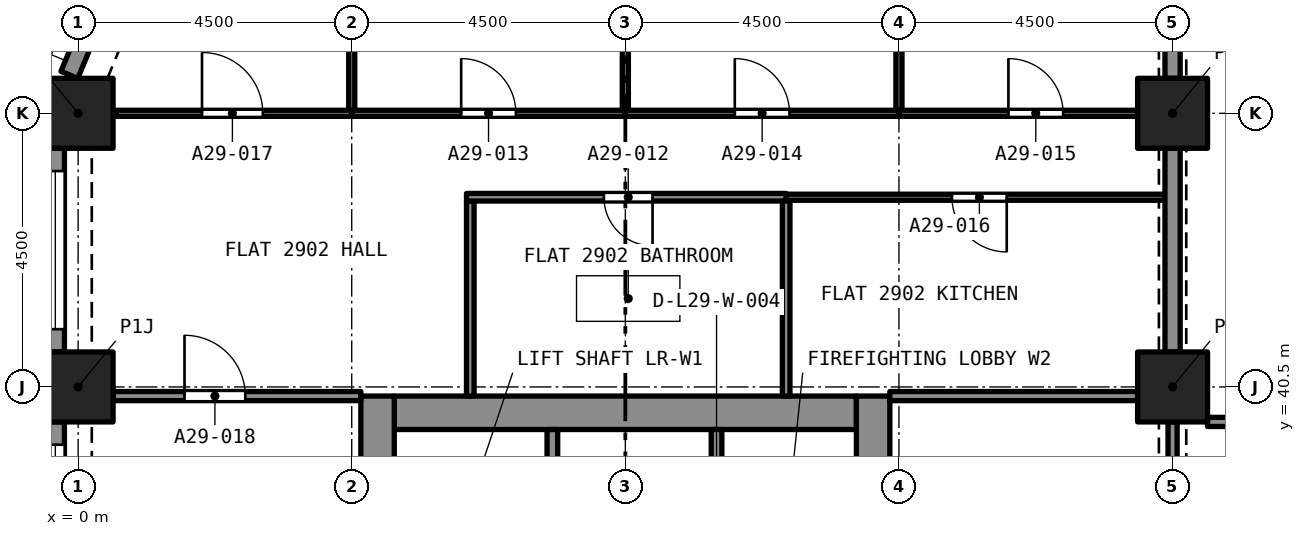
"""IFC4 building model, lengths in metres.
Left out: names, types, materials, properties, quantities, classifications, styles, units other than length and angle.
Written with IfcOpenShell. Run it as: python <this file> out.ifc"""

import sys

from ifc_helpers import new_model, si_unit, direction, frame, frame_2d, origin, origin_2d, place, context, subcontext, project, spatial, rectangle, extrude, element, fill, save


model = new_model("IFC4")
c1 = context("Model", 3, precision=1e-05, world=origin(), true_north=direction((0.0, 1.0)))
c2 = subcontext(c1, "Body", "Model", "MODEL_VIEW")
j1 = project(units=[si_unit("LENGTHUNIT", "METRE"), si_unit("PLANEANGLEUNIT", "RADIAN")], contexts=[c1])
p1 = place(None, origin())
s1 = spatial("IfcSite", under=j1, at=p1, CompositionType="ELEMENT")
p2 = place(p1, origin())
s2 = spatial("IfcBuilding", under=s1, at=p2, CompositionType="ELEMENT")
p3 = place(p2, frame((0.0, 0.0, 105.6)))
s3 = spatial("IfcBuildingStorey", under=s2, at=p3, CompositionType="ELEMENT", Elevation=105.6)
for number, where, z_axis, x_axis in (
    (1, (0.0, 40.5, 0.0), (0.0, 0.0, 1.0), (1.0, 0.0, 0.0)),
    (2, (18.0, 40.5, 0.0), (0.0, 0.0, 1.0), (1.0, 0.0, 0.0)),
    (3, (0.0, 45.0, 0.0), (0.0, 0.0, 1.0), (1.0, 0.0, 0.0)),
    (4, (18.0, 45.0, 0.0), (0.0, 0.0, 1.0), (1.0, 0.0, 0.0)),
):
    element("IfcColumn", number, at=place(p3, frame(where, z_axis=z_axis, x_axis=x_axis)), inside=s3, PredefinedType="COLUMN", context=c2, shape_type="SweptSolid", body=[
        extrude(rectangle(XDim=1.15, YDim=1.15, at=origin_2d()), origin(), (0.0, 0.0, 1.0), 3.2),
    ])
p4 = place(p3, frame((5.2, 40.075, 0.0), z_axis=(0.0, 0.0, 1.0), x_axis=(1.0, 0.0, 0.0)))
e5 = element("IfcWall", 5, at=p4, inside=s3, PredefinedType="SOLIDWALL", context=c2, shape_type="SweptSolid", body=[
    extrude(rectangle(XDim=7.6, YDim=0.55, at=frame_2d((3.8, 0.0))), origin(), (0.0, 0.0, 1.0), 3.2),
])
p5 = place(p3, frame((4.925, 27.15, 0.0), z_axis=(0.0, 0.0, 1.0), x_axis=(0.0, 1.0, 0.0)))
e6 = element("IfcWall", 6, at=p5, inside=s3, PredefinedType="SOLIDWALL", context=c2, shape_type="SweptSolid", body=[
    extrude(rectangle(XDim=13.2, YDim=0.55, at=frame_2d((6.6, 0.0))), origin(), (0.0, 0.0, 1.0), 3.2),
])
p6 = place(p5, frame((8.8, 0.0, 0.0)))
e7 = element("IfcOpeningElement", 7, at=p6, cuts=e6, PredefinedType="OPENING", context=c2, shape_type="SweptSolid", body=[
    extrude(rectangle(XDim=1.2, YDim=2.1, at=frame_2d((0.6, 1.05))), frame((0.0, 0.285, 0.0), z_axis=(0.0, -1.0, 0.0), x_axis=(1.0, 0.0, 0.0)), (0.0, 0.0, 1.0), 0.57),
])
p7 = place(p3, frame((13.075, 27.15, 0.0), z_axis=(0.0, 0.0, 1.0), x_axis=(0.0, 1.0, 0.0)))
e8 = element("IfcWall", 8, at=p7, inside=s3, PredefinedType="SOLIDWALL", context=c2, shape_type="SweptSolid", body=[
    extrude(rectangle(XDim=13.2, YDim=0.55, at=frame_2d((6.6, 0.0))), origin(), (0.0, 0.0, 1.0), 3.2),
])
p8 = place(p7, frame((10.95, 0.0, 0.0)))
e9 = element("IfcOpeningElement", 9, at=p8, cuts=e8, PredefinedType="OPENING", context=c2, shape_type="SweptSolid", body=[
    extrude(rectangle(XDim=1.1, YDim=2.1, at=frame_2d((0.55, 1.05))), frame((0.0, 0.285, 0.0), z_axis=(0.0, -1.0, 0.0), x_axis=(1.0, 0.0, 0.0)), (0.0, 0.0, 1.0), 0.57),
])
p9 = place(p7, frame((8.8, 0.0, 0.0)))
e10 = element("IfcOpeningElement", 10, at=p9, cuts=e8, PredefinedType="OPENING", context=c2, shape_type="SweptSolid", body=[
    extrude(rectangle(XDim=1.2, YDim=2.1, at=frame_2d((0.6, 1.05))), frame((0.0, 0.285, 0.0), z_axis=(0.0, -1.0, 0.0), x_axis=(1.0, 0.0, 0.0)), (0.0, 0.0, 1.0), 0.57),
])
p10 = place(p3, frame((-0.144, 45.632, 0.0), z_axis=(0.0, 0.0, 1.0), x_axis=(0.382723818695, 0.923862802911, 0.0)))
e11 = element("IfcWall", 11, at=p10, inside=s3, PredefinedType="SOLIDWALL", context=c2, shape_type="SweptSolid", body=[
    extrude(rectangle(XDim=2.164, YDim=0.3, at=frame_2d((1.082, 0.0))), origin(), (0.0, 0.0, 1.0), 3.2),
])
p11 = place(p10, frame((0.493, 0.0, 0.45)))
e12 = element("IfcOpeningElement", 12, at=p11, cuts=e11, PredefinedType="OPENING", context=c2, shape_type="SweptSolid", body=[
    extrude(rectangle(XDim=1.4, YDim=1.95, at=frame_2d((0.7, 0.975))), frame((0.0, 0.16, 0.0), z_axis=(0.0, -1.0, 0.0), x_axis=(1.0, 0.0, 0.0)), (0.0, 0.0, 1.0), 0.32),
])
p12 = place(p3, frame((-0.375, 41.075, 0.0), z_axis=(0.0, 0.0, 1.0), x_axis=(0.0, 1.0, 0.0)))
e13 = element("IfcWall", 13, at=p12, inside=s3, PredefinedType="SOLIDWALL", context=c2, shape_type="SweptSolid", body=[
    extrude(rectangle(XDim=3.35, YDim=0.3, at=frame_2d((1.675, 0.0))), origin(), (0.0, 0.0, 1.0), 3.2),
])
p13 = place(p12, frame((0.375, 0.0, 0.45)))
e14 = element("IfcOpeningElement", 14, at=p13, cuts=e13, PredefinedType="OPENING", context=c2, shape_type="SweptSolid", body=[
    extrude(rectangle(XDim=2.6, YDim=1.95, at=frame_2d((1.3, 0.975))), frame((0.0, 0.16, 0.0), z_axis=(0.0, -1.0, 0.0), x_axis=(1.0, 0.0, 0.0)), (0.0, 0.0, 1.0), 0.32),
])
p14 = place(p3, frame((-0.375, 36.575, 0.0), z_axis=(0.0, 0.0, 1.0), x_axis=(0.0, 1.0, 0.0)))
e15 = element("IfcWall", 15, at=p14, inside=s3, PredefinedType="SOLIDWALL", context=c2, shape_type="SweptSolid", body=[
    extrude(rectangle(XDim=3.35, YDim=0.3, at=frame_2d((1.675, 0.0))), origin(), (0.0, 0.0, 1.0), 3.2),
])
p15 = place(p14, frame((0.375, 0.0, 0.45)))
e16 = element("IfcOpeningElement", 16, at=p15, cuts=e15, PredefinedType="OPENING", context=c2, shape_type="SweptSolid", body=[
    extrude(rectangle(XDim=2.6, YDim=1.95, at=frame_2d((1.3, 0.975))), frame((0.0, 0.16, 0.0), z_axis=(0.0, -1.0, 0.0), x_axis=(1.0, 0.0, 0.0)), (0.0, 0.0, 1.0), 0.32),
])
p16 = place(p3, frame((6.45, 40.35, 0.0), z_axis=(0.0, 0.0, 1.0), x_axis=(0.0, 1.0, 0.0)))
e17 = element("IfcWall", 17, at=p16, inside=s3, PredefinedType="PARTITIONING", context=c2, shape_type="SweptSolid", body=[
    extrude(rectangle(XDim=3.208, YDim=0.125, at=frame_2d((1.604, 0.0))), origin(), (0.0, 0.0, 1.0), 2.9),
])
p17 = place(p3, frame((11.645, 43.62, 0.0), z_axis=(0.0, 0.0, 1.0), x_axis=(-1.0, 0.0, 0.0)))
e18 = element("IfcWall", 18, at=p17, inside=s3, PredefinedType="PARTITIONING", context=c2, shape_type="SweptSolid", body=[
    extrude(rectangle(XDim=5.258, YDim=0.125, at=frame_2d((2.629, 0.0))), origin(), (0.0, 0.0, 1.0), 2.9),
])
p18 = place(p17, frame((2.198, 0.0, 0.0)))
e19 = element("IfcOpeningElement", 19, at=p18, cuts=e18, PredefinedType="OPENING", context=c2, shape_type="SweptSolid", body=[
    extrude(rectangle(XDim=0.8, YDim=2.1, at=frame_2d((0.4, 1.05))), frame((0.0, 0.073, 0.0), z_axis=(0.0, -1.0, 0.0), x_axis=(1.0, 0.0, 0.0)), (0.0, 0.0, 1.0), 0.145),
])
p19 = place(p3, frame((11.645, 40.35, 0.0), z_axis=(0.0, 0.0, 1.0), x_axis=(0.0, 1.0, 0.0)))
e20 = element("IfcWall", 20, at=p19, inside=s3, PredefinedType="PARTITIONING", context=c2, shape_type="SweptSolid", body=[
    extrude(rectangle(XDim=3.208, YDim=0.125, at=frame_2d((1.604, 0.0))), origin(), (0.0, 0.0, 1.0), 2.9),
])
p20 = place(p3, frame((9.0, 45.05, 0.0), z_axis=(0.0, 0.0, 1.0), x_axis=(0.0, 1.0, 0.0)))
e21 = element("IfcWall", 21, at=p20, inside=s3, PredefinedType="PARTITIONING", context=c2, shape_type="SweptSolid", body=[
    extrude(rectangle(XDim=3.875, YDim=0.1, at=frame_2d((1.938, 0.0))), origin(), (0.0, 0.0, 1.0), 2.9),
])
p21 = place(p3, frame((4.5, 45.0, 0.0), z_axis=(0.0, 0.0, 1.0), x_axis=(1.0, 0.0, 0.0)))
e22 = element("IfcWall", 22, at=p21, inside=s3, PredefinedType="PARTITIONING", context=c2, shape_type="SweptSolid", body=[
    extrude(rectangle(XDim=4.5, YDim=0.1, at=frame_2d((2.25, 0.0))), origin(), (0.0, 0.0, 1.0), 2.9),
])
p22 = place(p21, frame((1.8, 0.0, 0.0)))
e23 = element("IfcOpeningElement", 23, at=p22, cuts=e22, PredefinedType="OPENING", context=c2, shape_type="SweptSolid", body=[
    extrude(rectangle(XDim=0.9, YDim=2.1, at=frame_2d((0.45, 1.05))), frame((0.0, 0.06, 0.0), z_axis=(0.0, -1.0, 0.0), x_axis=(1.0, 0.0, 0.0)), (0.0, 0.0, 1.0), 0.12),
])
p23 = place(p3, frame((4.5, 45.05, 0.0), z_axis=(0.0, 0.0, 1.0), x_axis=(0.0, 1.0, 0.0)))
e24 = element("IfcWall", 24, at=p23, inside=s3, PredefinedType="PARTITIONING", context=c2, shape_type="SweptSolid", body=[
    extrude(rectangle(XDim=3.828, YDim=0.1, at=frame_2d((1.914, 0.0))), origin(), (0.0, 0.0, 1.0), 2.9),
])
p24 = place(p3, frame((13.5, 45.05, 0.0), z_axis=(0.0, 0.0, 1.0), x_axis=(0.0, 1.0, 0.0)))
e25 = element("IfcWall", 25, at=p24, inside=s3, PredefinedType="PARTITIONING", context=c2, shape_type="SweptSolid", body=[
    extrude(rectangle(XDim=3.875, YDim=0.1, at=frame_2d((1.938, 0.0))), origin(), (0.0, 0.0, 1.0), 2.9),
])
p25 = place(p3, frame((9.0, 45.0, 0.0), z_axis=(0.0, 0.0, 1.0), x_axis=(1.0, 0.0, 0.0)))
e26 = element("IfcWall", 26, at=p25, inside=s3, PredefinedType="PARTITIONING", context=c2, shape_type="SweptSolid", body=[
    extrude(rectangle(XDim=4.5, YDim=0.1, at=frame_2d((2.25, 0.0))), origin(), (0.0, 0.0, 1.0), 2.9),
])
p26 = place(p25, frame((1.8, 0.0, 0.0)))
e27 = element("IfcOpeningElement", 27, at=p26, cuts=e26, PredefinedType="OPENING", context=c2, shape_type="SweptSolid", body=[
    extrude(rectangle(XDim=0.9, YDim=2.1, at=frame_2d((0.45, 1.05))), frame((0.0, 0.06, 0.0), z_axis=(0.0, -1.0, 0.0), x_axis=(1.0, 0.0, 0.0)), (0.0, 0.0, 1.0), 0.12),
])
p27 = place(p3, frame((13.5, 45.0, 0.0), z_axis=(0.0, 0.0, 1.0), x_axis=(1.0, 0.0, 0.0)))
e28 = element("IfcWall", 28, at=p27, inside=s3, PredefinedType="PARTITIONING", context=c2, shape_type="SweptSolid", body=[
    extrude(rectangle(XDim=3.925, YDim=0.1, at=frame_2d((1.962, 0.0))), origin(), (0.0, 0.0, 1.0), 2.9),
])
p28 = place(p27, frame((1.8, 0.0, 0.0)))
e29 = element("IfcOpeningElement", 29, at=p28, cuts=e28, PredefinedType="OPENING", context=c2, shape_type="SweptSolid", body=[
    extrude(rectangle(XDim=0.9, YDim=2.1, at=frame_2d((0.45, 1.05))), frame((0.0, 0.06, 0.0), z_axis=(0.0, -1.0, 0.0), x_axis=(1.0, 0.0, 0.0)), (0.0, 0.0, 1.0), 0.12),
])
p29 = place(p3, frame((18.0, 45.575, 0.0), z_axis=(0.0, 0.0, 1.0), x_axis=(0.0, 1.0, 0.0)))
e30 = element("IfcWall", 30, at=p29, inside=s3, PredefinedType="PARTITIONING", context=c2, shape_type="SweptSolid", body=[
    extrude(rectangle(XDim=3.35, YDim=0.25, at=frame_2d((1.675, 0.0))), origin(), (0.0, 0.0, 1.0), 2.38),
])
p30 = place(p3, frame((17.875, 43.62, 0.0), z_axis=(0.0, 0.0, 1.0), x_axis=(-1.0, 0.0, 0.0)))
e31 = element("IfcWall", 31, at=p30, inside=s3, PredefinedType="PARTITIONING", context=c2, shape_type="SweptSolid", body=[
    extrude(rectangle(XDim=6.23, YDim=0.1, at=frame_2d((3.115, 0.0))), origin(), (0.0, 0.0, 1.0), 2.9),
])
p31 = place(p30, frame((2.602, 0.0, 0.0)))
e32 = element("IfcOpeningElement", 32, at=p31, cuts=e31, PredefinedType="OPENING", context=c2, shape_type="SweptSolid", body=[
    extrude(rectangle(XDim=0.9, YDim=2.1, at=frame_2d((0.45, 1.05))), frame((0.0, 0.06, 0.0), z_axis=(0.0, -1.0, 0.0), x_axis=(1.0, 0.0, 0.0)), (0.0, 0.0, 1.0), 0.12),
])
p32 = place(p3, frame((0.622, 45.0, 0.0), z_axis=(0.0, 0.0, 1.0), x_axis=(1.0, 0.0, 0.0)))
e33 = element("IfcWall", 33, at=p32, inside=s3, PredefinedType="PARTITIONING", context=c2, shape_type="SweptSolid", body=[
    extrude(rectangle(XDim=3.878, YDim=0.1, at=frame_2d((1.939, 0.0))), origin(), (0.0, 0.0, 1.0), 2.9),
])
p33 = place(p32, frame((1.415, 0.0, 0.0)))
e34 = element("IfcOpeningElement", 34, at=p33, cuts=e33, PredefinedType="OPENING", context=c2, shape_type="SweptSolid", body=[
    extrude(rectangle(XDim=1.0, YDim=2.1, at=frame_2d((0.5, 1.05))), frame((0.0, 0.06, 0.0), z_axis=(0.0, -1.0, 0.0), x_axis=(1.0, 0.0, 0.0)), (0.0, 0.0, 1.0), 0.12),
])
p34 = place(p3, frame((0.575, 40.35, 0.0), z_axis=(0.0, 0.0, 1.0), x_axis=(1.0, 0.0, 0.0)))
e35 = element("IfcWall", 35, at=p34, inside=s3, PredefinedType="PARTITIONING", context=c2, shape_type="SweptSolid", body=[
    extrude(rectangle(XDim=4.075, YDim=0.15, at=frame_2d((2.038, 0.0))), origin(), (0.0, 0.0, 1.0), 2.9),
])
p35 = place(p34, frame((1.175, 0.0, 0.0)))
e36 = element("IfcOpeningElement", 36, at=p35, cuts=e35, PredefinedType="OPENING", context=c2, shape_type="SweptSolid", body=[
    extrude(rectangle(XDim=1.0, YDim=2.1, at=frame_2d((0.5, 1.05))), frame((0.0, 0.085, 0.0), z_axis=(0.0, -1.0, 0.0), x_axis=(1.0, 0.0, 0.0)), (0.0, 0.0, 1.0), 0.17),
])
p36 = place(p3, frame((18.0, 41.075, 0.0), z_axis=(0.0, 0.0, 1.0), x_axis=(0.0, 1.0, 0.0)))
e37 = element("IfcWall", 37, at=p36, inside=s3, PredefinedType="PARTITIONING", context=c2, shape_type="SweptSolid", body=[
    extrude(rectangle(XDim=3.35, YDim=0.25, at=frame_2d((1.675, 0.0))), origin(), (0.0, 0.0, 1.0), 2.38),
])
p37 = place(p3, frame((13.35, 40.35, 0.0), z_axis=(0.0, 0.0, 1.0), x_axis=(1.0, 0.0, 0.0)))
e38 = element("IfcWall", 38, at=p37, inside=s3, PredefinedType="PARTITIONING", context=c2, shape_type="SweptSolid", body=[
    extrude(rectangle(XDim=4.075, YDim=0.15, at=frame_2d((2.038, 0.0))), origin(), (0.0, 0.0, 1.0), 2.9),
])
p38 = place(p3, frame((18.575, 39.925, 0.0), z_axis=(0.0, 0.0, 1.0), x_axis=(1.0, 0.0, 0.0)))
e39 = element("IfcWall", 39, at=p38, inside=s3, PredefinedType="PARTITIONING", context=c2, shape_type="SweptSolid", body=[
    extrude(rectangle(XDim=8.425, YDim=0.15, at=frame_2d((4.212, 0.0))), origin(), (0.0, 0.0, 1.0), 2.75),
])
p39 = place(p38, frame((3.425, 0.0, 0.0)))
e40 = element("IfcOpeningElement", 40, at=p39, cuts=e39, PredefinedType="OPENING", context=c2, shape_type="SweptSolid", body=[
    extrude(rectangle(XDim=1.0, YDim=2.1, at=frame_2d((0.5, 1.05))), frame((0.0, 0.085, 0.0), z_axis=(0.0, -1.0, 0.0), x_axis=(1.0, 0.0, 0.0)), (0.0, 0.0, 1.0), 0.17),
])
p40 = place(p3, frame((18.0, 39.925, 0.0), z_axis=(0.0, 0.0, 1.0), x_axis=(0.0, -1.0, 0.0)))
e41 = element("IfcWall", 41, at=p40, inside=s3, PredefinedType="PARTITIONING", context=c2, shape_type="SweptSolid", body=[
    extrude(rectangle(XDim=3.35, YDim=0.15, at=frame_2d((1.675, 0.0))), origin(), (0.0, 0.0, 1.0), 2.38),
])
p41 = place(p40, frame((1.075, 0.0, 0.0)))
e42 = element("IfcOpeningElement", 42, at=p41, cuts=e41, PredefinedType="OPENING", context=c2, shape_type="SweptSolid", body=[
    extrude(rectangle(XDim=1.2, YDim=2.1, at=frame_2d((0.6, 1.05))), frame((0.0, 0.085, 0.0), z_axis=(0.0, -1.0, 0.0), x_axis=(1.0, 0.0, 0.0)), (0.0, 0.0, 1.0), 0.17),
])
p42 = place(p3, frame((7.8, 37.5, 0.0), z_axis=(0.0, 0.0, 1.0), x_axis=(0.0, 1.0, 0.0)))
e43 = element("IfcWall", 43, at=p42, inside=s3, PredefinedType="SOLIDWALL", context=c2, shape_type="SweptSolid", body=[
    extrude(rectangle(XDim=2.3, YDim=0.175, at=frame_2d((1.15, 0.0))), origin(), (0.0, 0.0, 1.0), 2.9),
])
p43 = place(p3, frame((10.5, 37.5, 0.0), z_axis=(0.0, 0.0, 1.0), x_axis=(0.0, 1.0, 0.0)))
e44 = element("IfcWall", 44, at=p43, inside=s3, PredefinedType="SOLIDWALL", context=c2, shape_type="SweptSolid", body=[
    extrude(rectangle(XDim=2.3, YDim=0.175, at=frame_2d((1.15, 0.0))), origin(), (0.0, 0.0, 1.0), 2.9),
])
p44 = place(p43, frame((0.65, 0.0, 0.0)))
e45 = element("IfcOpeningElement", 45, at=p44, cuts=e44, PredefinedType="OPENING", context=c2, shape_type="SweptSolid", body=[
    extrude(rectangle(XDim=1.0, YDim=2.1, at=frame_2d((0.5, 1.05))), frame((0.0, 0.097, 0.0), z_axis=(0.0, -1.0, 0.0), x_axis=(1.0, 0.0, 0.0)), (0.0, 0.0, 1.0), 0.195),
])
p45 = place(p13, origin())
e46 = element("IfcWindow", 46, at=p45, inside=s3, PartitioningType="SINGLE_PANEL", PredefinedType="WINDOW", context=c2, shape_type="SweptSolid", body=[
    extrude(rectangle(XDim=2.6, YDim=1.95, at=frame_2d((1.3, 0.975))), frame((0.0, 0.03, 0.0), z_axis=(0.0, -1.0, 0.0), x_axis=(1.0, 0.0, 0.0)), (0.0, 0.0, 1.0), 0.06),
])
fill(e14, e46)
p46 = place(p15, origin())
e47 = element("IfcWindow", 47, at=p46, inside=s3, PartitioningType="SINGLE_PANEL", PredefinedType="WINDOW", context=c2, shape_type="SweptSolid", body=[
    extrude(rectangle(XDim=2.6, YDim=1.95, at=frame_2d((1.3, 0.975))), frame((0.0, 0.03, 0.0), z_axis=(0.0, -1.0, 0.0), x_axis=(1.0, 0.0, 0.0)), (0.0, 0.0, 1.0), 0.06),
])
fill(e16, e47)
p47 = place(p18, origin())
e48 = element("IfcDoor", 48, at=p47, inside=s3, OperationType="SINGLE_SWING_LEFT", PredefinedType="DOOR", context=c2, shape_type="SweptSolid", body=[
    extrude(rectangle(XDim=0.8, YDim=2.1, at=frame_2d((0.4, 1.05))), frame((0.0, 0.025, 0.0), z_axis=(0.0, -1.0, 0.0), x_axis=(1.0, 0.0, 0.0)), (0.0, 0.0, 1.0), 0.05),
])
fill(e19, e48)
p48 = place(p22, origin())
e49 = element("IfcDoor", 49, at=p48, inside=s3, OperationType="SINGLE_SWING_RIGHT", PredefinedType="DOOR", context=c2, shape_type="SweptSolid", body=[
    extrude(rectangle(XDim=0.9, YDim=2.1, at=frame_2d((0.45, 1.05))), frame((0.0, 0.025, 0.0), z_axis=(0.0, -1.0, 0.0), x_axis=(1.0, 0.0, 0.0)), (0.0, 0.0, 1.0), 0.05),
])
fill(e23, e49)
p49 = place(p26, origin())
e50 = element("IfcDoor", 50, at=p49, inside=s3, OperationType="SINGLE_SWING_LEFT", PredefinedType="DOOR", context=c2, shape_type="SweptSolid", body=[
    extrude(rectangle(XDim=0.9, YDim=2.1, at=frame_2d((0.45, 1.05))), frame((0.0, 0.025, 0.0), z_axis=(0.0, -1.0, 0.0), x_axis=(1.0, 0.0, 0.0)), (0.0, 0.0, 1.0), 0.05),
])
fill(e27, e50)
p50 = place(p28, origin())
e51 = element("IfcDoor", 51, at=p50, inside=s3, OperationType="SINGLE_SWING_RIGHT", PredefinedType="DOOR", context=c2, shape_type="SweptSolid", body=[
    extrude(rectangle(XDim=0.9, YDim=2.1, at=frame_2d((0.45, 1.05))), frame((0.0, 0.025, 0.0), z_axis=(0.0, -1.0, 0.0), x_axis=(1.0, 0.0, 0.0)), (0.0, 0.0, 1.0), 0.05),
])
fill(e29, e51)
p51 = place(p31, origin())
e52 = element("IfcDoor", 52, at=p51, inside=s3, OperationType="SINGLE_SWING_LEFT", PredefinedType="DOOR", context=c2, shape_type="SweptSolid", body=[
    extrude(rectangle(XDim=0.9, YDim=2.1, at=frame_2d((0.45, 1.05))), frame((0.0, 0.025, 0.0), z_axis=(0.0, -1.0, 0.0), x_axis=(1.0, 0.0, 0.0)), (0.0, 0.0, 1.0), 0.05),
])
fill(e32, e52)
p52 = place(p33, origin())
e53 = element("IfcDoor", 53, at=p52, inside=s3, OperationType="SINGLE_SWING_LEFT", PredefinedType="DOOR", context=c2, shape_type="SweptSolid", body=[
    extrude(rectangle(XDim=1.0, YDim=2.1, at=frame_2d((0.5, 1.05))), frame((0.0, 0.025, 0.0), z_axis=(0.0, -1.0, 0.0), x_axis=(1.0, 0.0, 0.0)), (0.0, 0.0, 1.0), 0.05),
])
fill(e34, e53)
p53 = place(p35, origin())
e54 = element("IfcDoor", 54, at=p53, inside=s3, OperationType="SINGLE_SWING_LEFT", PredefinedType="DOOR", context=c2, shape_type="SweptSolid", body=[
    extrude(rectangle(XDim=1.0, YDim=2.1, at=frame_2d((0.5, 1.05))), frame((0.0, 0.025, 0.0), z_axis=(0.0, -1.0, 0.0), x_axis=(1.0, 0.0, 0.0)), (0.0, 0.0, 1.0), 0.05),
])
fill(e36, e54)
save(model, sys.argv[1])
